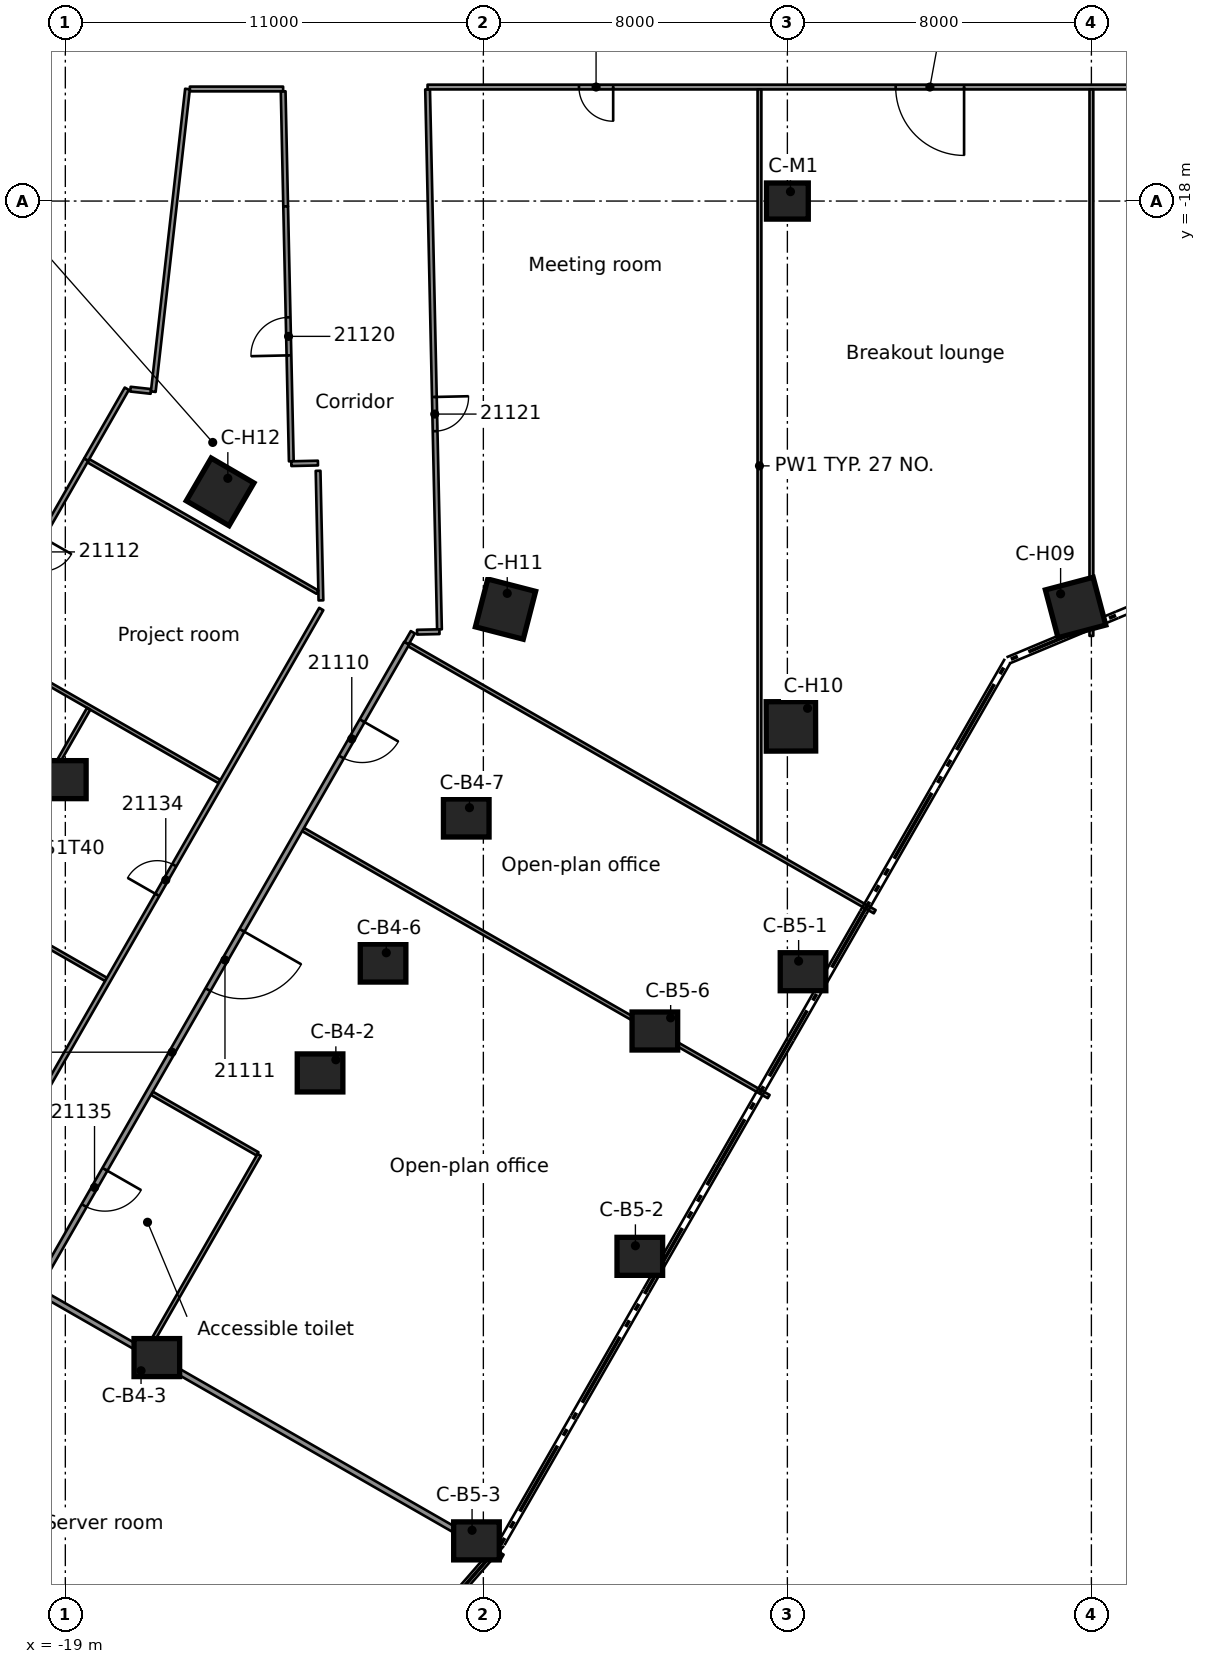
"""IFC4 building model, lengths in metres.
Left out: names, types, materials, properties, quantities, classifications, styles, units other than length and angle.
Written with IfcOpenShell. Run it as: python <this file> out.ifc"""

import sys

from ifc_helpers import new_model, si_unit, direction, frame, frame_2d, origin, origin_2d, place, context, subcontext, project, spatial, rectangle, extrude, element, fill, save


model = new_model("IFC4")
c1 = context("Model", 3, precision=1e-05, world=origin(), true_north=direction((0.0, 1.0)))
c2 = subcontext(c1, "Body", "Model", "MODEL_VIEW")
j1 = project(units=[si_unit("LENGTHUNIT", "METRE"), si_unit("PLANEANGLEUNIT", "RADIAN")], contexts=[c1])
p1 = place(None, origin())
s1 = spatial("IfcSite", under=j1, at=p1, CompositionType="ELEMENT")
p2 = place(p1, origin())
s2 = spatial("IfcBuilding", under=s1, at=p2, CompositionType="ELEMENT")
p3 = place(p2, frame((0.0, 0.0, 105.7)))
s3 = spatial("IfcBuildingStorey", under=s2, at=p3, CompositionType="ELEMENT", Elevation=105.7)
for number, where, z_axis, x_axis in (
    (1, (-19.053, -33.224, 0.0), (0.0, 0.0, 1.0), (1.0, 0.0, 0.0)),
    (2, (-12.297, -40.941, 0.0), (0.0, 0.0, 1.0), (1.0, 0.0, 0.0)),
    (3, (-16.592, -48.431, 0.0), (0.0, 0.0, 1.0), (1.0, 0.0, 0.0)),
    (4, (-10.639, -38.05, 0.0), (0.0, 0.0, 1.0), (1.0, 0.0, 0.0)),
    (5, (-8.45, -34.233, 0.0), (0.0, 0.0, 1.0), (1.0, 0.0, 0.0)),
    (6, (0.412, -38.278, 0.0), (0.0, 0.0, 1.0), (1.0, 0.0, 0.0)),
    (7, (-3.883, -45.767, 0.0), (0.0, 0.0, 1.0), (1.0, 0.0, 0.0)),
    (8, (-8.181, -53.254, 0.0), (0.0, 0.0, 1.0), (1.0, 0.0, 0.0)),
    (9, (-3.487, -39.838, 0.0), (0.0, 0.0, 1.0), (1.0, 0.0, 0.0)),
):
    element("IfcColumn", number, at=place(p3, frame(where, z_axis=z_axis, x_axis=x_axis)), inside=s3, PredefinedType="COLUMN", context=c2, shape_type="SweptSolid", body=[
        extrude(rectangle(XDim=1.2, YDim=1.0, at=origin_2d()), origin(), (0.0, 0.0, 1.0), 3.5),
    ])
for number, where, z_axis, x_axis in (
    (10, (7.584, -28.694, 0.0), (0.0, 0.0, 1.0), (0.256, -0.967, 0.0)),
    (11, (0.093, -31.822, 0.0), (0.0, 0.0, 1.0), (0.003, -1.0, 0.0)),
    (12, (-7.417, -28.737, 0.0), (0.0, 0.0, 1.0), (-0.25, -0.968, 0.0)),
    (13, (-14.927, -25.652, 0.0), (0.0, 0.0, 1.0), (-0.503, -0.864, 0.0)),
):
    element("IfcColumn", number, at=place(p3, frame(where, z_axis=z_axis, x_axis=x_axis)), inside=s3, PredefinedType="COLUMN", context=c2, shape_type="SweptSolid", body=[
        extrude(rectangle(XDim=1.3, YDim=1.3, at=origin_2d()), origin(), (0.0, 0.0, 1.0), 3.5),
    ])
p4 = place(p3, frame((0.0, -18.0, 0.0), z_axis=(0.0, 0.0, 1.0), x_axis=(1.0, 0.0, 0.0)))
e14 = element("IfcColumn", 14, at=p4, inside=s3, PredefinedType="COLUMN", context=c2, shape_type="SweptSolid", body=[
    extrude(rectangle(XDim=1.1, YDim=0.95, at=origin_2d()), origin(), (0.0, 0.0, 1.0), 3.5),
])
p5 = place(p3, frame((-13.268, -15.113, 0.0), z_axis=(0.0, 0.0, 1.0), x_axis=(0.02185314429, -0.999761191528, 0.0)))
e15 = element("IfcWall", 15, at=p5, inside=s3, PredefinedType="PARTITIONING", context=c2, shape_type="SweptSolid", body=[
    extrude(rectangle(XDim=3.028, YDim=0.125, at=frame_2d((1.514, 0.0))), origin(), (0.0, 0.0, 1.0), 3.08),
])
p6 = place(p3, frame((-13.054, -24.847, 0.0), z_axis=(0.0, 0.0, 1.0), x_axis=(-0.022053458667, 0.999756792906, 0.0)))
e16 = element("IfcWall", 16, at=p6, inside=s3, PredefinedType="PARTITIONING", context=c2, shape_type="SweptSolid", body=[
    extrude(rectangle(XDim=6.709, YDim=0.125, at=frame_2d((3.354, 0.0))), origin(), (0.0, 0.0, 1.0), 3.08),
])
p7 = place(p6, frame((2.788, 0.0, 0.0)))
e17 = element("IfcOpeningElement", 17, at=p7, cuts=e16, PredefinedType="OPENING", context=c2, shape_type="SweptSolid", body=[
    extrude(rectangle(XDim=1.0, YDim=2.1, at=frame_2d((0.5, 1.05))), frame((0.0, 0.073, 0.0), z_axis=(0.0, -1.0, 0.0), x_axis=(1.0, 0.0, 0.0)), (0.0, 0.0, 1.0), 0.145),
])
p8 = place(p3, frame((-12.274, -28.507, 0.0), z_axis=(0.0, 0.0, 1.0), x_axis=(-0.022051353947, 0.999756839331, 0.0)))
e18 = element("IfcWall", 18, at=p8, inside=s3, PredefinedType="PARTITIONING", context=c2, shape_type="SweptSolid", body=[
    extrude(rectangle(XDim=3.41, YDim=0.125, at=frame_2d((1.705, 0.0))), origin(), (0.0, 0.0, 1.0), 3.08),
])
p9 = place(p3, frame((-9.467, -15.062, 0.0), z_axis=(0.0, 0.0, 1.0), x_axis=(0.021956487302, -0.999758927275, 0.0)))
e19 = element("IfcWall", 19, at=p9, inside=s3, PredefinedType="PARTITIONING", context=c2, shape_type="SweptSolid", body=[
    extrude(rectangle(XDim=14.21, YDim=0.125, at=frame_2d((7.105, 0.0))), origin(), (0.0, 0.0, 1.0), 3.08),
])
p10 = place(p9, frame((8.095, 0.0, 0.0)))
e20 = element("IfcOpeningElement", 20, at=p10, cuts=e19, PredefinedType="OPENING", context=c2, shape_type="SweptSolid", body=[
    extrude(rectangle(XDim=0.9, YDim=2.1, at=frame_2d((0.45, 1.05))), frame((0.0, 0.073, 0.0), z_axis=(0.0, -1.0, 0.0), x_axis=(1.0, 0.0, 0.0)), (0.0, 0.0, 1.0), 0.145),
])
p11 = place(p3, frame((-19.709, -46.681, 0.0), z_axis=(0.0, 0.0, 1.0), x_axis=(0.867456145265, -0.497513654126, 0.0)))
e21 = element("IfcWall", 21, at=p11, inside=s3, PredefinedType="PARTITIONING", context=c2, shape_type="SweptSolid", body=[
    extrude(rectangle(XDim=14.07, YDim=0.15, at=frame_2d((7.035, 0.0))), origin(), (0.0, 0.0, 1.0), 3.08),
])
p12 = place(p3, frame((-16.724, -41.476, 0.0), z_axis=(0.0, 0.0, 1.0), x_axis=(0.867553640943, -0.497343623752, 0.0)))
e22 = element("IfcWall", 22, at=p12, inside=s3, PredefinedType="PARTITIONING", context=c2, shape_type="SweptSolid", body=[
    extrude(rectangle(XDim=3.207, YDim=0.1, at=frame_2d((1.604, 0.0))), origin(), (0.0, 0.0, 1.0), 3.08),
])
p13 = place(p3, frame((-21.302, -36.546, 0.0), z_axis=(0.0, 0.0, 1.0), x_axis=(0.867492112241, -0.49745093748, 0.0)))
e23 = element("IfcWall", 23, at=p13, inside=s3, PredefinedType="PARTITIONING", context=c2, shape_type="SweptSolid", body=[
    extrude(rectangle(XDim=3.886, YDim=0.1, at=frame_2d((1.943, 0.0))), origin(), (0.0, 0.0, 1.0), 3.08),
])
p14 = place(p3, frame((-21.181, -29.699, 0.0), z_axis=(0.0, 0.0, 1.0), x_axis=(0.867554846835, -0.497341520219, 0.0)))
e24 = element("IfcWall", 24, at=p14, inside=s3, PredefinedType="PARTITIONING", context=c2, shape_type="SweptSolid", body=[
    extrude(rectangle(XDim=7.19, YDim=0.1, at=frame_2d((3.595, 0.0))), origin(), (0.0, 0.0, 1.0), 3.08),
])
p15 = place(p3, frame((-12.745, -34.536, 0.0), z_axis=(0.0, 0.0, 1.0), x_axis=(0.867470957273, -0.497487827277, 0.0)))
e25 = element("IfcWall", 25, at=p15, inside=s3, PredefinedType="PARTITIONING", context=c2, shape_type="SweptSolid", body=[
    extrude(rectangle(XDim=14.125, YDim=0.1, at=frame_2d((7.062, 0.0))), origin(), (0.0, 0.0, 1.0), 3.08),
])
p16 = place(p3, frame((-18.395, -24.833, 0.0), z_axis=(0.0, 0.0, 1.0), x_axis=(0.86747241126, -0.497485291946, 0.0)))
e26 = element("IfcWall", 26, at=p16, inside=s3, PredefinedType="PARTITIONING", context=c2, shape_type="SweptSolid", body=[
    extrude(rectangle(XDim=6.949, YDim=0.1, at=frame_2d((3.475, 0.0))), origin(), (0.0, 0.0, 1.0), 3.08),
])
p17 = place(p3, frame((-9.956, -29.672, 0.0), z_axis=(0.0, 0.0, 1.0), x_axis=(0.867495524847, -0.497444986276, 0.0)))
e27 = element("IfcWall", 27, at=p17, inside=s3, PredefinedType="PARTITIONING", context=c2, shape_type="SweptSolid", body=[
    extrude(rectangle(XDim=14.126, YDim=0.1, at=frame_2d((7.063, 0.0))), origin(), (0.0, 0.0, 1.0), 3.08),
])
p18 = place(p3, frame((-17.287, -22.949, 0.0), z_axis=(0.0, 0.0, 1.0), x_axis=(0.993828621155, -0.110926425047, 0.0)))
e28 = element("IfcWall", 28, at=p18, inside=s3, PredefinedType="PARTITIONING", context=c2, shape_type="SweptSolid", body=[
    extrude(rectangle(XDim=0.542, YDim=0.125, at=frame_2d((0.271, 0.0))), origin(), (0.0, 0.0, 1.0), 3.08),
])
p19 = place(p3, frame((-15.723, -15.051, 0.0), z_axis=(0.0, 0.0, 1.0), x_axis=(1.0, 0.0, 0.0)))
e29 = element("IfcWall", 29, at=p19, inside=s3, PredefinedType="PARTITIONING", context=c2, shape_type="SweptSolid", body=[
    extrude(rectangle(XDim=2.454, YDim=0.125, at=frame_2d((1.227, 0.0))), origin(), (0.0, 0.0, 1.0), 3.08),
])
p20 = place(p3, frame((10.99, -15.0, 0.0), z_axis=(0.0, 0.0, 1.0), x_axis=(-1.0, 0.0, 0.0)))
e30 = element("IfcWall", 30, at=p20, inside=s3, PredefinedType="PARTITIONING", context=c2, shape_type="SweptSolid", body=[
    extrude(rectangle(XDim=20.458, YDim=0.125, at=frame_2d((10.229, 0.0))), origin(), (0.0, 0.0, 1.0), 3.08),
])
p21 = place(p20, frame((15.574, 0.0, 0.0)))
e31 = element("IfcOpeningElement", 31, at=p21, cuts=e30, PredefinedType="OPENING", context=c2, shape_type="SweptSolid", body=[
    extrude(rectangle(XDim=0.9, YDim=2.1, at=frame_2d((0.45, 1.05))), frame((0.0, 0.073, 0.0), z_axis=(0.0, -1.0, 0.0), x_axis=(1.0, 0.0, 0.0)), (0.0, 0.0, 1.0), 0.145),
])
p22 = place(p20, frame((6.34, 0.0, 0.0)))
e32 = element("IfcOpeningElement", 32, at=p22, cuts=e30, PredefinedType="OPENING", context=c2, shape_type="SweptSolid", body=[
    extrude(rectangle(XDim=1.8, YDim=2.1, at=frame_2d((0.9, 1.05))), frame((0.0, 0.073, 0.0), z_axis=(0.0, -1.0, 0.0), x_axis=(1.0, 0.0, 0.0)), (0.0, 0.0, 1.0), 0.145),
])
p23 = place(p3, frame((-9.744, -29.344, 0.0), z_axis=(0.0, 0.0, 1.0), x_axis=(0.999758670784, 0.021968163164, 0.0)))
e33 = element("IfcWall", 33, at=p23, inside=s3, PredefinedType="PARTITIONING", context=c2, shape_type="SweptSolid", body=[
    extrude(rectangle(XDim=0.589, YDim=0.125, at=frame_2d((0.294, 0.0))), origin(), (0.0, 0.0, 1.0), 3.08),
])
p24 = place(p3, frame((-13.053, -24.91, 0.0), z_axis=(0.0, 0.0, 1.0), x_axis=(0.999743094177, 0.022665957838, 0.0)))
e34 = element("IfcWall", 34, at=p24, inside=s3, PredefinedType="PARTITIONING", context=c2, shape_type="SweptSolid", body=[
    extrude(rectangle(XDim=0.7, YDim=0.125, at=frame_2d((0.35, 0.0))), origin(), (0.0, 0.0, 1.0), 3.08),
])
p25 = place(p3, frame((-10.021, -29.635, 0.0), z_axis=(0.0, 0.0, 1.0), x_axis=(0.498030726652, 0.867159382876, 0.0)))
e35 = element("IfcWall", 35, at=p25, inside=s3, PredefinedType="PARTITIONING", context=c2, shape_type="SweptSolid", body=[
    extrude(rectangle(XDim=0.333, YDim=0.125, at=frame_2d((0.167, 0.0))), origin(), (0.0, 0.0, 1.0), 3.08),
])
p26 = place(p3, frame((-16.847, -48.236, 0.0), z_axis=(0.0, 0.0, 1.0), x_axis=(0.497509382409, 0.867458595217, 0.0)))
e36 = element("IfcWall", 36, at=p26, inside=s3, PredefinedType="PARTITIONING", context=c2, shape_type="SweptSolid", body=[
    extrude(rectangle(XDim=5.926, YDim=0.1, at=frame_2d((2.963, 0.0))), origin(), (0.0, 0.0, 1.0), 3.08),
])
p27 = place(p3, frame((-10.02, -29.636, 0.0), z_axis=(0.0, 0.0, 1.0), x_axis=(-0.49748968286, -0.867469893107, 0.0)))
e37 = element("IfcWall", 37, at=p27, inside=s3, PredefinedType="PARTITIONING", context=c2, shape_type="SweptSolid", body=[
    extrude(rectangle(XDim=24.807, YDim=0.15, at=frame_2d((12.403, 0.0))), origin(), (0.0, 0.0, 1.0), 3.08),
])
p28 = place(p27, frame((2.35, 0.0, 0.0)))
e38 = element("IfcOpeningElement", 38, at=p28, cuts=e37, PredefinedType="OPENING", context=c2, shape_type="SweptSolid", body=[
    extrude(rectangle(XDim=1.1, YDim=2.1, at=frame_2d((0.55, 1.05))), frame((0.0, 0.085, 0.0), z_axis=(0.0, -1.0, 0.0), x_axis=(1.0, 0.0, 0.0)), (0.0, 0.0, 1.0), 0.17),
])
p29 = place(p27, frame((8.707, 0.0, 0.0)))
e39 = element("IfcOpeningElement", 39, at=p29, cuts=e37, PredefinedType="OPENING", context=c2, shape_type="SweptSolid", body=[
    extrude(rectangle(XDim=1.8, YDim=2.1, at=frame_2d((0.9, 1.05))), frame((0.0, 0.085, 0.0), z_axis=(0.0, -1.0, 0.0), x_axis=(1.0, 0.0, 0.0)), (0.0, 0.0, 1.0), 0.17),
])
p30 = place(p27, frame((15.957, 0.0, 0.0)))
e40 = element("IfcOpeningElement", 40, at=p30, cuts=e37, PredefinedType="OPENING", context=c2, shape_type="SweptSolid", body=[
    extrude(rectangle(XDim=1.1, YDim=2.1, at=frame_2d((0.55, 1.05))), frame((0.0, 0.085, 0.0), z_axis=(0.0, -1.0, 0.0), x_axis=(1.0, 0.0, 0.0)), (0.0, 0.0, 1.0), 0.17),
])
p31 = place(p3, frame((-23.101, -47.618, 0.0), z_axis=(0.0, 0.0, 1.0), x_axis=(0.497706797126, 0.867345343041, 0.0)))
e41 = element("IfcWall", 41, at=p31, inside=s3, PredefinedType="PARTITIONING", context=c2, shape_type="SweptSolid", body=[
    extrude(rectangle(XDim=21.772, YDim=0.125, at=frame_2d((10.886, 0.0))), origin(), (0.0, 0.0, 1.0), 3.08),
])
p32 = place(p31, frame((0.85, 0.0, 0.0)))
e42 = element("IfcOpeningElement", 42, at=p32, cuts=e41, PredefinedType="OPENING", context=c2, shape_type="SweptSolid", body=[
    extrude(rectangle(XDim=0.9, YDim=2.1, at=frame_2d((0.45, 1.05))), frame((0.0, 0.073, 0.0), z_axis=(0.0, -1.0, 0.0), x_axis=(1.0, 0.0, 0.0)), (0.0, 0.0, 1.0), 0.145),
])
p33 = place(p31, frame((13.1, 0.0, 0.0)))
e43 = element("IfcOpeningElement", 43, at=p33, cuts=e41, PredefinedType="OPENING", context=c2, shape_type="SweptSolid", body=[
    extrude(rectangle(XDim=0.9, YDim=2.1, at=frame_2d((0.45, 1.05))), frame((0.0, 0.073, 0.0), z_axis=(0.0, -1.0, 0.0), x_axis=(1.0, 0.0, 0.0)), (0.0, 0.0, 1.0), 0.145),
])
p34 = place(p3, frame((-21.345, -36.521, 0.0), z_axis=(0.0, 0.0, 1.0), x_axis=(0.497305055322, 0.867575749978, 0.0)))
e44 = element("IfcWall", 44, at=p34, inside=s3, PredefinedType="PARTITIONING", context=c2, shape_type="SweptSolid", body=[
    extrude(rectangle(XDim=5.95, YDim=0.1, at=frame_2d((2.975, 0.0))), origin(), (0.0, 0.0, 1.0), 3.08),
])
p35 = place(p3, frame((-18.449, -24.802, 0.0), z_axis=(0.0, 0.0, 1.0), x_axis=(-0.496915373234, -0.867799004288, 0.0)))
e45 = element("IfcWall", 45, at=p35, inside=s3, PredefinedType="PARTITIONING", context=c2, shape_type="SweptSolid", body=[
    extrude(rectangle(XDim=22.107, YDim=0.125, at=frame_2d((11.053, 0.0))), origin(), (0.0, 0.0, 1.0), 3.08),
])
p36 = place(p35, frame((2.35, 0.0, 0.0)))
e46 = element("IfcOpeningElement", 46, at=p36, cuts=e45, PredefinedType="OPENING", context=c2, shape_type="SweptSolid", body=[
    extrude(rectangle(XDim=0.9, YDim=2.1, at=frame_2d((0.45, 1.05))), frame((0.0, 0.073, 0.0), z_axis=(0.0, -1.0, 0.0), x_axis=(1.0, 0.0, 0.0)), (0.0, 0.0, 1.0), 0.145),
])
p37 = place(p35, frame((12.207, 0.0, 0.0)))
e47 = element("IfcOpeningElement", 47, at=p37, cuts=e45, PredefinedType="OPENING", context=c2, shape_type="SweptSolid", body=[
    extrude(rectangle(XDim=0.9, YDim=2.1, at=frame_2d((0.45, 1.05))), frame((0.0, 0.073, 0.0), z_axis=(0.0, -1.0, 0.0), x_axis=(1.0, 0.0, 0.0)), (0.0, 0.0, 1.0), 0.145),
])
p38 = place(p3, frame((-18.449, -24.802, 0.0), z_axis=(0.0, 0.0, 1.0), x_axis=(0.49675090032, 0.867893163374, 0.0)))
e48 = element("IfcWall", 48, at=p38, inside=s3, PredefinedType="PARTITIONING", context=c2, shape_type="SweptSolid", body=[
    extrude(rectangle(XDim=2.148, YDim=0.125, at=frame_2d((1.074, 0.0))), origin(), (0.0, 0.0, 1.0), 3.08),
])
p39 = place(p3, frame((-16.686, -23.016, 0.0), z_axis=(0.0, 0.0, 1.0), x_axis=(0.112430566881, 0.993659583374, 0.0)))
e49 = element("IfcWall", 49, at=p39, inside=s3, PredefinedType="PARTITIONING", context=c2, shape_type="SweptSolid", body=[
    extrude(rectangle(XDim=8.015, YDim=0.125, at=frame_2d((4.007, 0.0))), origin(), (0.0, 0.0, 1.0), 3.08),
])
p40 = place(p3, frame((8.0, -29.441, 0.0), z_axis=(0.0, 0.0, 1.0), x_axis=(0.0, 1.0, 0.0)))
e50 = element("IfcWall", 50, at=p40, inside=s3, PredefinedType="PARTITIONING", context=c2, shape_type="SweptSolid", body=[
    extrude(rectangle(XDim=14.378, YDim=0.1, at=frame_2d((7.189, 0.0))), origin(), (0.0, 0.0, 1.0), 3.08),
])
p41 = place(p3, frame((-0.735, -34.874, 0.0), z_axis=(0.0, 0.0, 1.0), x_axis=(6.1614294e-05, 0.999999998102, 0.0)))
e51 = element("IfcWall", 51, at=p41, inside=s3, PredefinedType="PARTITIONING", context=c2, shape_type="SweptSolid", body=[
    extrude(rectangle(XDim=19.812, YDim=0.1, at=frame_2d((9.906, 0.0))), origin(), (0.0, 0.0, 1.0), 3.08),
])
p42 = place(p28, origin())
e52 = element("IfcDoor", 52, at=p42, inside=s3, OperationType="SINGLE_SWING_LEFT", PredefinedType="DOOR", context=c2, shape_type="SweptSolid", body=[
    extrude(rectangle(XDim=1.1, YDim=2.1, at=frame_2d((0.55, 1.05))), frame((0.0, 0.025, 0.0), z_axis=(0.0, -1.0, 0.0), x_axis=(1.0, 0.0, 0.0)), (0.0, 0.0, 1.0), 0.05),
])
fill(e38, e52)
p43 = place(p29, origin())
e53 = element("IfcDoor", 53, at=p43, inside=s3, OperationType="DOUBLE_DOOR_SINGLE_SWING", PredefinedType="DOOR", context=c2, shape_type="SweptSolid", body=[
    extrude(rectangle(XDim=1.8, YDim=2.1, at=frame_2d((0.9, 1.05))), frame((0.0, 0.025, 0.0), z_axis=(0.0, -1.0, 0.0), x_axis=(1.0, 0.0, 0.0)), (0.0, 0.0, 1.0), 0.05),
])
fill(e39, e53)
p44 = place(p7, origin())
e54 = element("IfcDoor", 54, at=p44, inside=s3, OperationType="SINGLE_SWING_LEFT", PredefinedType="DOOR", context=c2, shape_type="SweptSolid", body=[
    extrude(rectangle(XDim=1.0, YDim=2.1, at=frame_2d((0.5, 1.05))), frame((0.0, 0.025, 0.0), z_axis=(0.0, -1.0, 0.0), x_axis=(1.0, 0.0, 0.0)), (0.0, 0.0, 1.0), 0.05),
])
fill(e17, e54)
p45 = place(p10, origin())
e55 = element("IfcDoor", 55, at=p45, inside=s3, OperationType="SINGLE_SWING_RIGHT", PredefinedType="DOOR", context=c2, shape_type="SweptSolid", body=[
    extrude(rectangle(XDim=0.9, YDim=2.1, at=frame_2d((0.45, 1.05))), frame((0.0, 0.025, 0.0), z_axis=(0.0, -1.0, 0.0), x_axis=(1.0, 0.0, 0.0)), (0.0, 0.0, 1.0), 0.05),
])
fill(e20, e55)
p46 = place(p21, origin())
e56 = element("IfcDoor", 56, at=p46, inside=s3, OperationType="SINGLE_SWING_RIGHT", PredefinedType="DOOR", context=c2, shape_type="SweptSolid", body=[
    extrude(rectangle(XDim=0.9, YDim=2.1, at=frame_2d((0.45, 1.05))), frame((0.0, 0.025, 0.0), z_axis=(0.0, -1.0, 0.0), x_axis=(1.0, 0.0, 0.0)), (0.0, 0.0, 1.0), 0.05),
])
fill(e31, e56)
p47 = place(p22, origin())
e57 = element("IfcDoor", 57, at=p47, inside=s3, OperationType="DOUBLE_DOOR_SINGLE_SWING", PredefinedType="DOOR", context=c2, shape_type="SweptSolid", body=[
    extrude(rectangle(XDim=1.8, YDim=2.1, at=frame_2d((0.9, 1.05))), frame((0.0, 0.025, 0.0), z_axis=(0.0, -1.0, 0.0), x_axis=(1.0, 0.0, 0.0)), (0.0, 0.0, 1.0), 0.05),
])
fill(e32, e57)
p48 = place(p33, origin())
e58 = element("IfcDoor", 58, at=p48, inside=s3, OperationType="SINGLE_SWING_RIGHT", PredefinedType="DOOR", context=c2, shape_type="SweptSolid", body=[
    extrude(rectangle(XDim=0.9, YDim=2.1, at=frame_2d((0.45, 1.05))), frame((0.0, 0.025, 0.0), z_axis=(0.0, -1.0, 0.0), x_axis=(1.0, 0.0, 0.0)), (0.0, 0.0, 1.0), 0.05),
])
fill(e43, e58)
p49 = place(p30, origin())
e59 = element("IfcDoor", 59, at=p49, inside=s3, OperationType="SINGLE_SWING_RIGHT", PredefinedType="DOOR", context=c2, shape_type="SweptSolid", body=[
    extrude(rectangle(XDim=1.1, YDim=2.1, at=frame_2d((0.55, 1.05))), frame((0.0, 0.025, 0.0), z_axis=(0.0, -1.0, 0.0), x_axis=(1.0, 0.0, 0.0)), (0.0, 0.0, 1.0), 0.05),
])
fill(e40, e59)
save(model, sys.argv[1])
